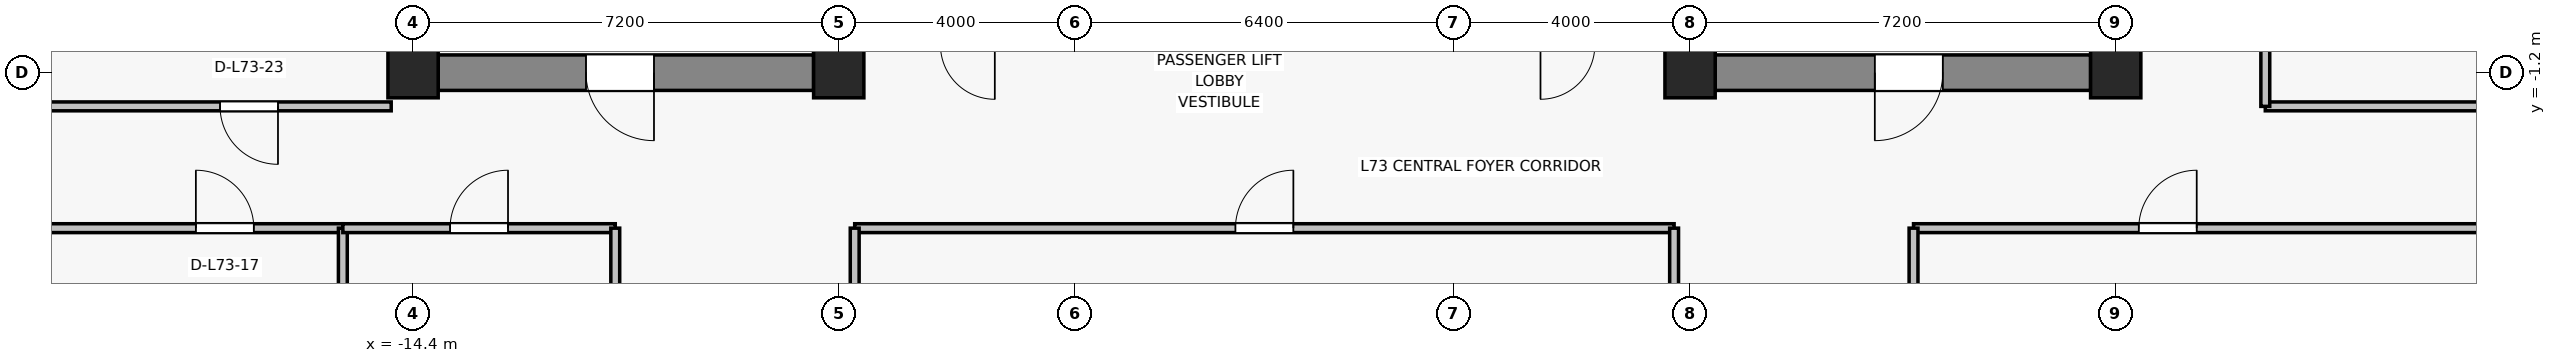
"""IFC4 building model, lengths in metres.
Left out: names, types, materials, properties, quantities, classifications, styles, units other than length and angle.
Written with IfcOpenShell. Run it as: python <this file> out.ifc"""

import sys

from ifc_helpers import new_model, si_unit, direction, frame, frame_2d, origin, origin_2d, place, context, subcontext, project, spatial, rectangle, extrude, source, transform, mapped, element, fill, save


model = new_model("IFC4")
c1 = context("Model", 3, precision=1e-05, world=origin(), true_north=direction((0.0, 1.0)))
c2 = subcontext(c1, "Body", "Model", "MODEL_VIEW")
j1 = project(units=[si_unit("LENGTHUNIT", "METRE"), si_unit("PLANEANGLEUNIT", "RADIAN")], contexts=[c1])
p1 = place(None, origin())
s1 = spatial("IfcSite", under=j1, at=p1, CompositionType="ELEMENT")
p2 = place(p1, origin())
s2 = spatial("IfcBuilding", under=s1, at=p2, CompositionType="ELEMENT")
p3 = place(p2, frame((0.0, 0.0, 258.4)))
s3 = spatial("IfcBuildingStorey", under=s2, at=p3, CompositionType="ELEMENT", Elevation=258.4)
for number, where, z_axis, x_axis in (
    (1, (-14.4, -1.2, 0.0), (0.0, 0.0, 1.0), (1.0, 0.0, 0.0)),
    (2, (-7.2, -1.2, 0.0), (0.0, 0.0, 1.0), (1.0, 0.0, 0.0)),
    (3, (7.2, -1.2, 0.0), (0.0, 0.0, 1.0), (1.0, 0.0, 0.0)),
    (4, (14.4, -1.2, 0.0), (0.0, 0.0, 1.0), (1.0, 0.0, 0.0)),
):
    element("IfcColumn", number, at=place(p3, frame(where, z_axis=z_axis, x_axis=x_axis)), inside=s3, PredefinedType="COLUMN", context=c2, shape_type="SweptSolid", body=[
        extrude(rectangle(XDim=0.85, YDim=0.85, at=origin_2d()), origin(), (0.0, 0.0, 1.0), 3.3),
    ])
p4 = place(p3, frame((-7.625, -1.2, 0.0), z_axis=(0.0, 0.0, 1.0), x_axis=(-1.0, 0.0, 0.0)))
e5 = element("IfcWall", 5, at=p4, inside=s3, PredefinedType="SHEAR", context=c2, shape_type="SweptSolid", body=[
    extrude(rectangle(XDim=6.35, YDim=0.6, at=frame_2d((3.175, 0.0))), origin(), (0.0, 0.0, 1.0), 3.075),
])
p5 = place(p4, frame((2.7, 0.0, 0.0)))
e6 = element("IfcOpeningElement", 6, at=p5, cuts=e5, PredefinedType="OPENING", context=c2, shape_type="SweptSolid", body=[
    extrude(rectangle(XDim=1.15, YDim=2.15, at=frame_2d((0.575, 1.075))), frame((0.0, 0.31, 0.0), z_axis=(0.0, -1.0, 0.0), x_axis=(1.0, 0.0, 0.0)), (0.0, 0.0, 1.0), 0.62),
])
p6 = place(p3, frame((13.975, -1.2, 0.0), z_axis=(0.0, 0.0, 1.0), x_axis=(-1.0, 0.0, 0.0)))
e7 = element("IfcWall", 7, at=p6, inside=s3, PredefinedType="SHEAR", context=c2, shape_type="SweptSolid", body=[
    extrude(rectangle(XDim=6.35, YDim=0.6, at=frame_2d((3.175, 0.0))), origin(), (0.0, 0.0, 1.0), 3.075),
])
p7 = place(p6, frame((2.5, 0.0, 0.0)))
e8 = element("IfcOpeningElement", 8, at=p7, cuts=e7, PredefinedType="OPENING", context=c2, shape_type="SweptSolid", body=[
    extrude(rectangle(XDim=1.15, YDim=2.15, at=frame_2d((0.575, 1.075))), frame((0.0, 0.31, 0.0), z_axis=(0.0, -1.0, 0.0), x_axis=(1.0, 0.0, 0.0)), (0.0, 0.0, 1.0), 0.62),
])
for number, where, z_axis, x_axis in (
    (9, (-7.4, -0.9, 0.0), (0.0, 0.0, 1.0), (0.0, 1.0, 0.0)),
    (10, (7.4, -0.9, 0.0), (0.0, 0.0, 1.0), (0.0, 1.0, 0.0)),
):
    element("IfcWall", number, at=place(p3, frame(where, z_axis=z_axis, x_axis=x_axis)), inside=s3, PredefinedType="SHEAR", context=c2, shape_type="SweptSolid", body=[
        extrude(rectangle(XDim=4.15, YDim=0.45, at=frame_2d((2.075, 0.0))), origin(), (0.0, 0.0, 1.0), 3.075),
    ])
p8 = place(p3, frame((-21.53, -3.83, 0.0), z_axis=(0.0, 0.0, 1.0), x_axis=(1.0, 0.0, 0.0)))
e11 = element("IfcWall", 11, at=p8, inside=s3, PredefinedType="PARTITIONING", context=c2, shape_type="SweptSolid", body=[
    extrude(rectangle(XDim=5.942, YDim=0.15, at=frame_2d((2.971, 0.0))), origin(), (0.0, 0.0, 1.0), 2.765),
])
p9 = place(p8, frame((3.456, 0.0, 0.0)))
e12 = element("IfcOpeningElement", 12, at=p9, cuts=e11, PredefinedType="OPENING", context=c2, shape_type="SweptSolid", body=[
    extrude(rectangle(XDim=0.98, YDim=2.15, at=frame_2d((0.49, 1.075))), frame((0.0, 0.085, 0.0), z_axis=(0.0, -1.0, 0.0), x_axis=(1.0, 0.0, 0.0)), (0.0, 0.0, 1.0), 0.17),
])
p10 = place(p3, frame((-15.588, -3.83, 0.0), z_axis=(0.0, 0.0, 1.0), x_axis=(0.0, -1.0, 0.0)))
e13 = element("IfcWall", 13, at=p10, inside=s3, PredefinedType="PARTITIONING", context=c2, shape_type="SweptSolid", body=[
    extrude(rectangle(XDim=6.89, YDim=0.15, at=frame_2d((3.445, 0.0))), origin(), (0.0, 0.0, 1.0), 2.615),
])
p11 = place(p3, frame((-15.588, -3.83, 0.0), z_axis=(0.0, 0.0, 1.0), x_axis=(1.0, 0.0, 0.0)))
e14 = element("IfcWall", 14, at=p11, inside=s3, PredefinedType="PARTITIONING", context=c2, shape_type="SweptSolid", body=[
    extrude(rectangle(XDim=4.608, YDim=0.15, at=frame_2d((2.304, 0.0))), origin(), (0.0, 0.0, 1.0), 2.615),
])
p12 = place(p11, frame((1.814, 0.0, 0.0)))
e15 = element("IfcOpeningElement", 15, at=p12, cuts=e14, PredefinedType="OPENING", context=c2, shape_type="SweptSolid", body=[
    extrude(rectangle(XDim=0.98, YDim=2.15, at=frame_2d((0.49, 1.075))), frame((0.0, 0.085, 0.0), z_axis=(0.0, -1.0, 0.0), x_axis=(1.0, 0.0, 0.0)), (0.0, 0.0, 1.0), 0.17),
])
p13 = place(p3, frame((-10.98, -3.83, 0.0), z_axis=(0.0, 0.0, 1.0), x_axis=(0.0, -1.0, 0.0)))
e16 = element("IfcWall", 16, at=p13, inside=s3, PredefinedType="PARTITIONING", context=c2, shape_type="SweptSolid", body=[
    extrude(rectangle(XDim=6.89, YDim=0.15, at=frame_2d((3.445, 0.0))), origin(), (0.0, 0.0, 1.0), 2.615),
])
p14 = place(p3, frame((10.98, -3.83, 0.0), z_axis=(0.0, 0.0, 1.0), x_axis=(1.0, 0.0, 0.0)))
e17 = element("IfcWall", 17, at=p14, inside=s3, PredefinedType="PARTITIONING", context=c2, shape_type="SweptSolid", body=[
    extrude(rectangle(XDim=10.55, YDim=0.15, at=frame_2d((5.275, 0.0))), origin(), (0.0, 0.0, 1.0), 2.615),
])
p15 = place(p14, frame((3.81, 0.0, 0.0)))
e18 = element("IfcOpeningElement", 18, at=p15, cuts=e17, PredefinedType="OPENING", context=c2, shape_type="SweptSolid", body=[
    extrude(rectangle(XDim=0.98, YDim=2.15, at=frame_2d((0.49, 1.075))), frame((0.0, 0.085, 0.0), z_axis=(0.0, -1.0, 0.0), x_axis=(1.0, 0.0, 0.0)), (0.0, 0.0, 1.0), 0.17),
])
p16 = place(p3, frame((10.98, -10.72, 0.0), z_axis=(0.0, 0.0, 1.0), x_axis=(0.0, 1.0, 0.0)))
e19 = element("IfcWall", 19, at=p16, inside=s3, PredefinedType="PARTITIONING", context=c2, shape_type="SweptSolid", body=[
    extrude(rectangle(XDim=6.89, YDim=0.15, at=frame_2d((3.445, 0.0))), origin(), (0.0, 0.0, 1.0), 2.615),
])
p17 = place(p3, frame((-6.93, -3.83, 0.0), z_axis=(0.0, 0.0, 1.0), x_axis=(1.0, 0.0, 0.0)))
e20 = element("IfcWall", 20, at=p17, inside=s3, PredefinedType="PARTITIONING", context=c2, shape_type="SweptSolid", body=[
    extrude(rectangle(XDim=13.86, YDim=0.15, at=frame_2d((6.93, 0.0))), origin(), (0.0, 0.0, 1.0), 2.615),
])
p18 = place(p17, frame((6.44, 0.0, 0.0)))
e21 = element("IfcOpeningElement", 21, at=p18, cuts=e20, PredefinedType="OPENING", context=c2, shape_type="SweptSolid", body=[
    extrude(rectangle(XDim=0.98, YDim=2.15, at=frame_2d((0.49, 1.075))), frame((0.0, 0.085, 0.0), z_axis=(0.0, -1.0, 0.0), x_axis=(1.0, 0.0, 0.0)), (0.0, 0.0, 1.0), 0.17),
])
for number, where, z_axis, x_axis in (
    (22, (-6.93, -9.205, 0.0), (0.0, 0.0, 1.0), (0.0, 1.0, 0.0)),
    (23, (6.93, -3.83, 0.0), (0.0, 0.0, 1.0), (0.0, -1.0, 0.0)),
):
    element("IfcWall", number, at=place(p3, frame(where, z_axis=z_axis, x_axis=x_axis)), inside=s3, PredefinedType="PARTITIONING", context=c2, shape_type="SweptSolid", body=[
        extrude(rectangle(XDim=5.375, YDim=0.15, at=frame_2d((2.688, 0.0))), origin(), (0.0, 0.0, 1.0), 2.615),
    ])
p19 = place(p3, frame((-14.77, -1.77, 0.0), z_axis=(0.0, 0.0, 1.0), x_axis=(-1.0, 0.0, 0.0)))
e24 = element("IfcWall", 24, at=p19, inside=s3, PredefinedType="PARTITIONING", context=c2, shape_type="SweptSolid", body=[
    extrude(rectangle(XDim=6.76, YDim=0.15, at=frame_2d((3.38, 0.0))), origin(), (0.0, 0.0, 1.0), 2.765),
])
p20 = place(p19, frame((1.915, 0.0, 0.0)))
e25 = element("IfcOpeningElement", 25, at=p20, cuts=e24, PredefinedType="OPENING", context=c2, shape_type="SweptSolid", body=[
    extrude(rectangle(XDim=0.98, YDim=2.15, at=frame_2d((0.49, 1.075))), frame((0.0, 0.085, 0.0), z_axis=(0.0, -1.0, 0.0), x_axis=(1.0, 0.0, 0.0)), (0.0, 0.0, 1.0), 0.17),
])
p21 = place(p3, frame((21.53, -1.77, 0.0), z_axis=(0.0, 0.0, 1.0), x_axis=(-1.0, 0.0, 0.0)))
e26 = element("IfcWall", 26, at=p21, inside=s3, PredefinedType="PARTITIONING", context=c2, shape_type="SweptSolid", body=[
    extrude(rectangle(XDim=4.6, YDim=0.15, at=frame_2d((2.3, 0.0))), origin(), (0.0, 0.0, 1.0), 2.765),
])
p22 = place(p3, frame((16.93, -1.77, 0.0), z_axis=(0.0, 0.0, 1.0), x_axis=(0.0, 1.0, 0.0)))
e27 = element("IfcWall", 27, at=p22, inside=s3, PredefinedType="PARTITIONING", context=c2, shape_type="SweptSolid", body=[
    extrude(rectangle(XDim=5.068, YDim=0.15, at=frame_2d((2.534, 0.0))), origin(), (0.0, 0.0, 1.0), 2.615),
])
p23 = place(p22, frame((2.044, 0.0, 0.0)))
e28 = element("IfcOpeningElement", 28, at=p23, cuts=e27, PredefinedType="OPENING", context=c2, shape_type="SweptSolid", body=[
    extrude(rectangle(XDim=0.98, YDim=2.15, at=frame_2d((0.49, 1.075))), frame((0.0, 0.085, 0.0), z_axis=(0.0, -1.0, 0.0), x_axis=(1.0, 0.0, 0.0)), (0.0, 0.0, 1.0), 0.17),
])
m1 = source(origin(), c2, "Body", "SweptSolid", [
    extrude(rectangle(XDim=1.15, YDim=2.15, at=frame_2d((0.575, 1.075))), frame((0.0, 0.025, 0.0), z_axis=(0.0, -1.0, 0.0), x_axis=(1.0, 0.0, 0.0)), (0.0, 0.0, 1.0), 0.05),
])
p24 = place(p5, origin())
e29 = element("IfcDoor", 29, at=p24, inside=s3, OperationType="SINGLE_SWING_LEFT", PredefinedType="DOOR", context=c2, shape_type="MappedRepresentation", body=[
    mapped(m1, transform((0.0, 0.0, 0.0), x_axis=(1.0, 0.0, 0.0), y_axis=(0.0, 1.0, 0.0), z_axis=(0.0, 0.0, 1.0), scale=1.0)),
])
fill(e6, e29)
p25 = place(p7, origin())
e30 = element("IfcDoor", 30, at=p25, inside=s3, OperationType="SINGLE_SWING_RIGHT", PredefinedType="DOOR", context=c2, shape_type="MappedRepresentation", body=[
    mapped(m1, transform((0.0, 0.0, 0.0), x_axis=(1.0, 0.0, 0.0), y_axis=(0.0, 1.0, 0.0), z_axis=(0.0, 0.0, 1.0), scale=1.0)),
])
fill(e8, e30)
m2 = source(origin(), c2, "Body", "SweptSolid", [
    extrude(rectangle(XDim=0.98, YDim=2.15, at=frame_2d((0.49, 1.075))), frame((0.0, 0.025, 0.0), z_axis=(0.0, -1.0, 0.0), x_axis=(1.0, 0.0, 0.0)), (0.0, 0.0, 1.0), 0.05),
])
p26 = place(p9, origin())
e31 = element("IfcDoor", 31, at=p26, inside=s3, OperationType="SINGLE_SWING_LEFT", PredefinedType="DOOR", context=c2, shape_type="MappedRepresentation", body=[
    mapped(m2, transform((0.0, 0.0, 0.0), x_axis=(1.0, 0.0, 0.0), y_axis=(0.0, 1.0, 0.0), z_axis=(0.0, 0.0, 1.0), scale=1.0)),
])
fill(e12, e31)
p27 = place(p12, origin())
e32 = element("IfcDoor", 32, at=p27, inside=s3, OperationType="SINGLE_SWING_RIGHT", PredefinedType="DOOR", context=c2, shape_type="MappedRepresentation", body=[
    mapped(m2, transform((0.0, 0.0, 0.0), x_axis=(1.0, 0.0, 0.0), y_axis=(0.0, 1.0, 0.0), z_axis=(0.0, 0.0, 1.0), scale=1.0)),
])
fill(e15, e32)
p28 = place(p15, origin())
e33 = element("IfcDoor", 33, at=p28, inside=s3, OperationType="SINGLE_SWING_RIGHT", PredefinedType="DOOR", context=c2, shape_type="MappedRepresentation", body=[
    mapped(m2, transform((0.0, 0.0, 0.0), x_axis=(1.0, 0.0, 0.0), y_axis=(0.0, 1.0, 0.0), z_axis=(0.0, 0.0, 1.0), scale=1.0)),
])
fill(e18, e33)
p29 = place(p18, origin())
e34 = element("IfcDoor", 34, at=p29, inside=s3, OperationType="SINGLE_SWING_RIGHT", PredefinedType="DOOR", context=c2, shape_type="MappedRepresentation", body=[
    mapped(m2, transform((0.0, 0.0, 0.0), x_axis=(1.0, 0.0, 0.0), y_axis=(0.0, 1.0, 0.0), z_axis=(0.0, 0.0, 1.0), scale=1.0)),
])
fill(e21, e34)
p30 = place(p20, origin())
e35 = element("IfcDoor", 35, at=p30, inside=s3, OperationType="SINGLE_SWING_LEFT", PredefinedType="DOOR", context=c2, shape_type="MappedRepresentation", body=[
    mapped(m2, transform((0.0, 0.0, 0.0), x_axis=(1.0, 0.0, 0.0), y_axis=(0.0, 1.0, 0.0), z_axis=(0.0, 0.0, 1.0), scale=1.0)),
])
fill(e25, e35)
save(model, sys.argv[1])
